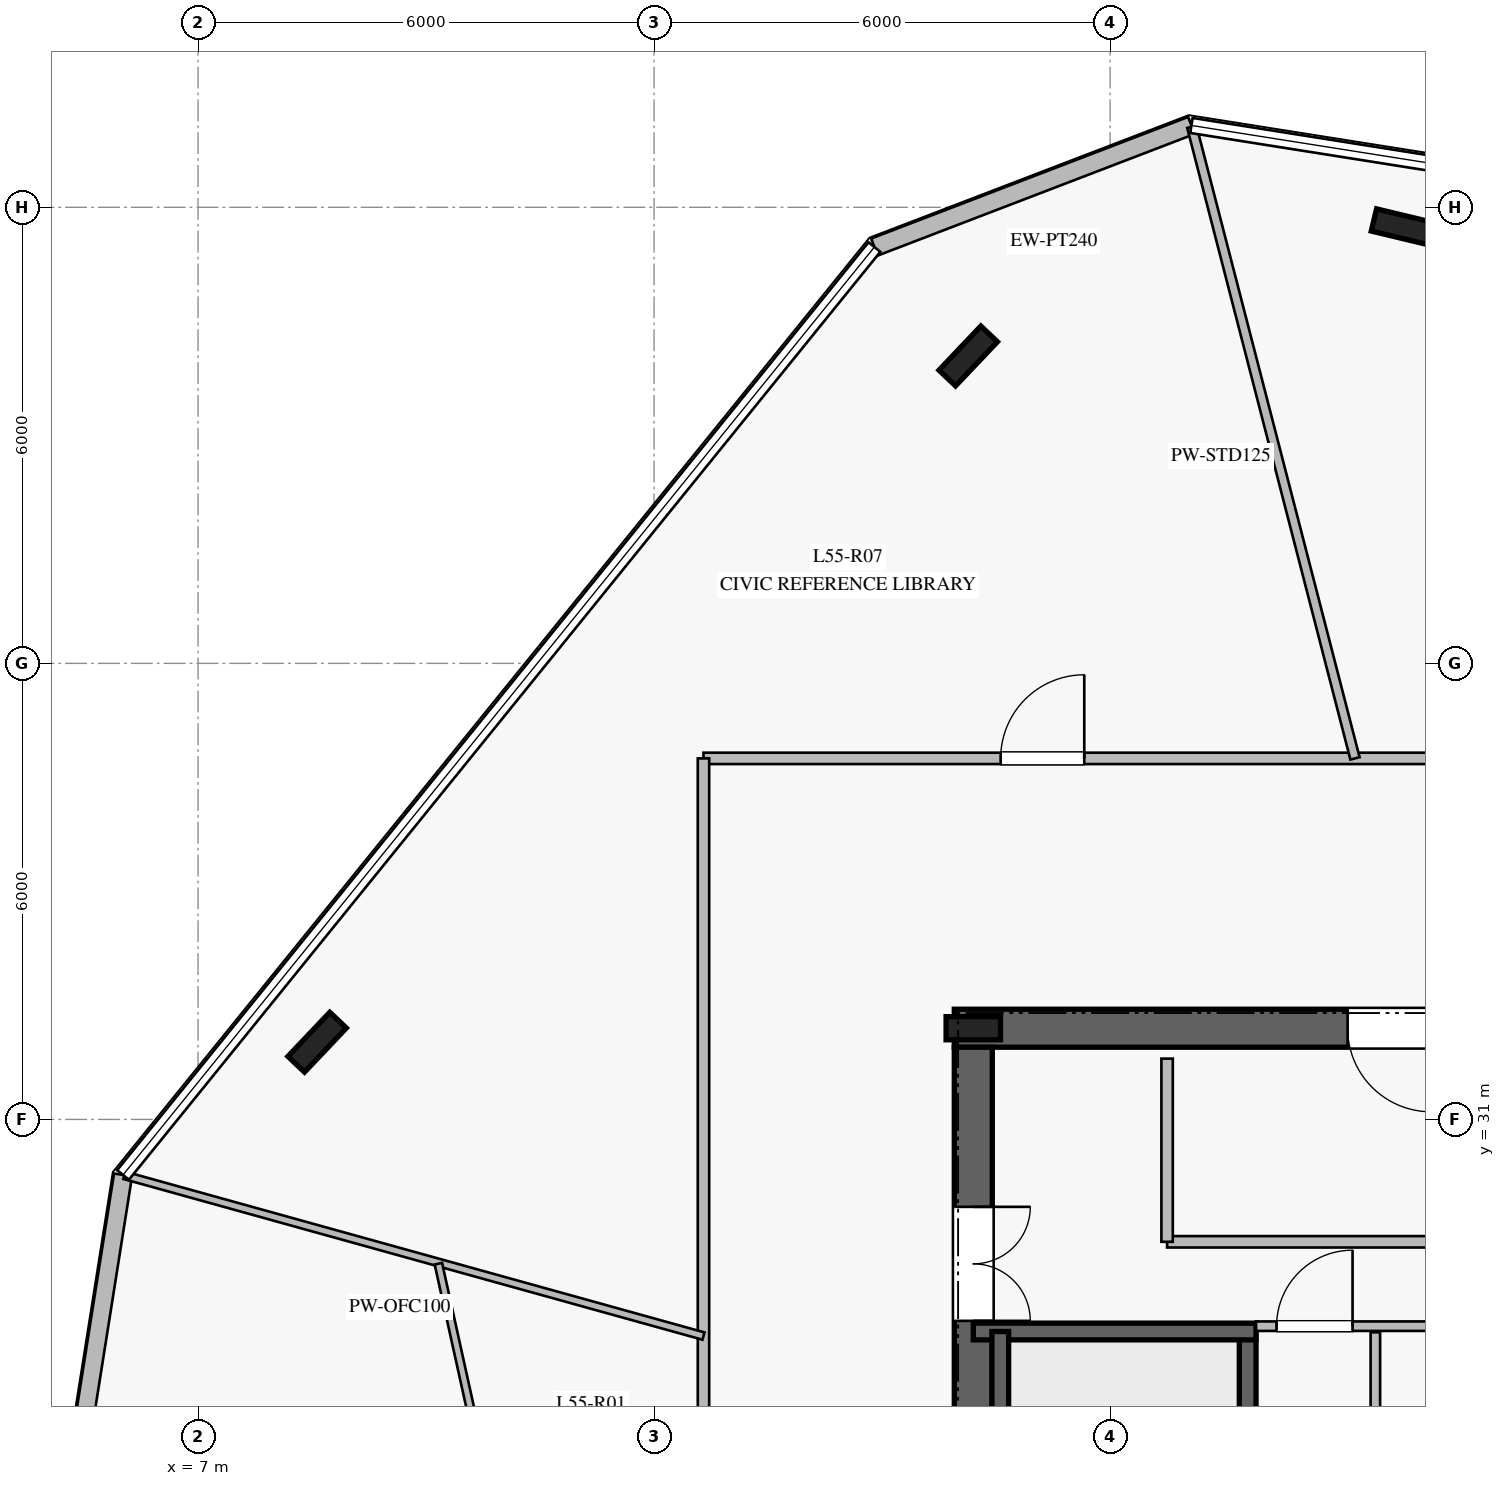
"""IFC4 building model, lengths in metres.
Left out: names, types, materials, properties, quantities, classifications, styles, units other than length and angle.
Written with IfcOpenShell. Run it as: python <this file> out.ifc"""

import sys

from ifc_helpers import new_model, si_unit, direction, frame, frame_2d, origin, origin_2d, place, context, subcontext, project, spatial, rectangle, i_section, extrude, element, fill, save


model = new_model("IFC4")
c1 = context("Model", 3, precision=1e-05, world=origin(), true_north=direction((0.0, 1.0)))
c2 = subcontext(c1, "Body", "Model", "MODEL_VIEW")
j1 = project(units=[si_unit("LENGTHUNIT", "METRE"), si_unit("PLANEANGLEUNIT", "RADIAN")], contexts=[c1])
p1 = place(None, origin())
s1 = spatial("IfcSite", under=j1, at=p1, CompositionType="ELEMENT")
p2 = place(p1, origin())
s2 = spatial("IfcBuilding", under=s1, at=p2, CompositionType="ELEMENT")
p3 = place(p2, frame((0.0, 0.0, 228.8)))
s3 = spatial("IfcBuildingStorey", under=s2, at=p3, CompositionType="ELEMENT", Elevation=228.8)
p4 = place(p3, frame((33.05, 32.2, 0.0), z_axis=(0.0, 0.0, 1.0), x_axis=(-1.0, 0.0, 0.0)))
e1 = element("IfcWall", 1, at=p4, inside=s3, PredefinedType="SHEAR", context=c2, shape_type="SweptSolid", body=[
    extrude(rectangle(XDim=16.1, YDim=0.5, at=frame_2d((8.05, 0.0))), origin(), (0.0, 0.0, 1.0), 3.78),
])
p5 = place(p4, frame((5.0, 0.0, 0.0)))
e2 = element("IfcOpeningElement", 2, at=p5, cuts=e1, PredefinedType="OPENING", context=c2, shape_type="SweptSolid", body=[
    extrude(rectangle(XDim=1.2, YDim=2.25, at=frame_2d((0.6, 1.125))), frame((0.0, 0.26, 0.0), z_axis=(0.0, -1.0, 0.0), x_axis=(1.0, 0.0, 0.0)), (0.0, 0.0, 1.0), 0.52),
])
p6 = place(p4, frame((9.825, 0.0, 0.0)))
e3 = element("IfcOpeningElement", 3, at=p6, cuts=e1, PredefinedType="OPENING", context=c2, shape_type="SweptSolid", body=[
    extrude(rectangle(XDim=1.1, YDim=2.2, at=frame_2d((0.55, 1.1))), frame((0.0, 0.26, 0.0), z_axis=(0.0, -1.0, 0.0), x_axis=(1.0, 0.0, 0.0)), (0.0, 0.0, 1.0), 0.52),
])
p7 = place(p3, frame((17.2, 31.95, 0.0), z_axis=(0.0, 0.0, 1.0), x_axis=(0.0, -1.0, 0.0)))
e4 = element("IfcWall", 4, at=p7, inside=s3, PredefinedType="SHEAR", context=c2, shape_type="SweptSolid", body=[
    extrude(rectangle(XDim=13.9, YDim=0.5, at=frame_2d((6.95, 0.0))), origin(), (0.0, 0.0, 1.0), 3.78),
])
p8 = place(p7, frame((2.1, 0.0, 0.0)))
e5 = element("IfcOpeningElement", 5, at=p8, cuts=e4, PredefinedType="OPENING", context=c2, shape_type="SweptSolid", body=[
    extrude(rectangle(XDim=1.5, YDim=2.2, at=frame_2d((0.75, 1.1))), frame((0.0, 0.26, 0.0), z_axis=(0.0, -1.0, 0.0), x_axis=(1.0, 0.0, 0.0)), (0.0, 0.0, 1.0), 0.52),
])
p9 = place(p3, frame((17.2, 32.2, 0.0), z_axis=(0.0, 0.0, 1.0), x_axis=(1.0, 0.0, 0.0)))
e6 = element("IfcColumn", 6, at=p9, inside=s3, PredefinedType="COLUMN", context=c2, shape_type="SweptSolid", body=[
    extrude(i_section(OverallWidth=0.304, OverallDepth=0.716, WebThickness=0.021, FlangeThickness=0.04, at=origin_2d()), origin(), (0.0, 0.0, 1.0), 4.0),
])
p10 = place(p3, frame((20.81, 20.99, 0.0), z_axis=(0.0, 0.0, 1.0), x_axis=(0.0, 1.0, 0.0)))
e7 = element("IfcWall", 7, at=p10, inside=s3, PredefinedType="SOLIDWALL", context=c2, shape_type="SweptSolid", body=[
    extrude(rectangle(XDim=7.22, YDim=0.22, at=frame_2d((3.61, 0.0))), origin(), (0.0, 0.0, 1.0), 3.78),
])
p11 = place(p10, frame((0.18, 0.0, 0.0)))
e8 = element("IfcOpeningElement", 8, at=p11, cuts=e7, PredefinedType="OPENING", context=c2, shape_type="SweptSolid", body=[
    extrude(rectangle(XDim=1.15, YDim=2.2, at=frame_2d((0.575, 1.1))), frame((0.0, 0.12, 0.0), z_axis=(0.0, -1.0, 0.0), x_axis=(1.0, 0.0, 0.0)), (0.0, 0.0, 1.0), 0.24),
])
p12 = place(p3, frame((17.2, 28.21, 0.0), z_axis=(0.0, 0.0, 1.0), x_axis=(1.0, 0.0, 0.0)))
e9 = element("IfcWall", 9, at=p12, inside=s3, PredefinedType="SOLIDWALL", context=c2, shape_type="SweptSolid", body=[
    extrude(rectangle(XDim=3.72, YDim=0.22, at=frame_2d((1.86, 0.0))), origin(), (0.0, 0.0, 1.0), 3.78),
])
p13 = place(p3, frame((17.555, 28.21, 0.0), z_axis=(0.0, 0.0, 1.0), x_axis=(0.0, -1.0, 0.0)))
e10 = element("IfcWall", 10, at=p13, inside=s3, PredefinedType="SOLIDWALL", context=c2, shape_type="SweptSolid", body=[
    extrude(rectangle(XDim=7.22, YDim=0.22, at=frame_2d((3.61, 0.0))), origin(), (0.0, 0.0, 1.0), 3.78),
])
for number, where, z_axis, x_axis in (
    (11, (22.86, 42.74, 0.0), (0.0, 0.0, 1.0), (-0.972, 0.233, 0.0)),
    (12, (17.133, 41.044, 0.0), (0.0, 0.0, 1.0), (0.688, 0.725, 0.0)),
    (13, (8.567, 32.016, 0.0), (0.0, 0.0, 1.0), (0.688, 0.725, 0.0)),
):
    element("IfcColumn", number, at=place(p3, frame(where, z_axis=z_axis, x_axis=x_axis)), inside=s3, PredefinedType="COLUMN", context=c2, shape_type="SweptSolid", body=[
        extrude(i_section(OverallWidth=0.3, OverallDepth=0.8, WebThickness=0.018, FlangeThickness=0.033, at=origin_2d()), origin(), (0.0, 0.0, 1.0), 4.0),
    ])
p14 = place(p3, frame((20.07, 44.077, 0.0), z_axis=(0.0, 0.0, 1.0), x_axis=(-0.933677607011, -0.358114682982, 0.0)))
e14 = element("IfcWall", 14, at=p14, inside=s3, PredefinedType="STANDARD", context=c2, shape_type="SweptSolid", body=[
    extrude(rectangle(XDim=4.468, YDim=0.24, at=frame_2d((2.234, 0.0))), origin(), (0.0, 0.0, 1.0), 3.78),
])
p15 = place(p3, frame((6.013, 30.27, 0.0), z_axis=(0.0, 0.0, 1.0), x_axis=(-0.156402986275, -0.987693325828, 0.0)))
e15 = element("IfcWall", 15, at=p15, inside=s3, PredefinedType="STANDARD", context=c2, shape_type="SweptSolid", body=[
    extrude(rectangle(XDim=4.469, YDim=0.24, at=frame_2d((2.234, 0.0))), origin(), (0.0, 0.0, 1.0), 3.78),
])
p16 = place(p3, frame((20.92, 28.28, 0.0), z_axis=(0.0, 0.0, 1.0), x_axis=(1.0, 0.0, 0.0)))
e16 = element("IfcWall", 16, at=p16, inside=s3, PredefinedType="PARTITIONING", context=c2, shape_type="SweptSolid", body=[
    extrude(rectangle(XDim=3.405, YDim=0.125, at=frame_2d((1.703, 0.0))), origin(), (0.0, 0.0, 1.0), 3.78),
])
p17 = place(p16, frame((0.27, 0.0, 0.0)))
e17 = element("IfcOpeningElement", 17, at=p17, cuts=e16, PredefinedType="OPENING", context=c2, shape_type="SweptSolid", body=[
    extrude(rectangle(XDim=1.0, YDim=2.15, at=frame_2d((0.5, 1.075))), frame((0.0, 0.073, 0.0), z_axis=(0.0, -1.0, 0.0), x_axis=(1.0, 0.0, 0.0)), (0.0, 0.0, 1.0), 0.145),
])
p18 = place(p3, frame((22.49, 24.97, 0.0), z_axis=(0.0, 0.0, 1.0), x_axis=(0.0, 1.0, 0.0)))
e18 = element("IfcWall", 18, at=p18, inside=s3, PredefinedType="PARTITIONING", context=c2, shape_type="SweptSolid", body=[
    extrude(rectangle(XDim=3.23, YDim=0.125, at=frame_2d((1.615, 0.0))), origin(), (0.0, 0.0, 1.0), 3.78),
])
p19 = place(p3, frame((19.75, 29.39, 0.0), z_axis=(0.0, 0.0, 1.0), x_axis=(1.0, 0.0, 0.0)))
e19 = element("IfcWall", 19, at=p19, inside=s3, PredefinedType="PARTITIONING", context=c2, shape_type="SweptSolid", body=[
    extrude(rectangle(XDim=5.9, YDim=0.15, at=frame_2d((2.95, 0.0))), origin(), (0.0, 0.0, 1.0), 3.78),
])
p20 = place(p3, frame((19.75, 29.39, 0.0), z_axis=(0.0, 0.0, 1.0), x_axis=(0.0, 1.0, 0.0)))
e20 = element("IfcWall", 20, at=p20, inside=s3, PredefinedType="PARTITIONING", context=c2, shape_type="SweptSolid", body=[
    extrude(rectangle(XDim=2.41, YDim=0.15, at=frame_2d((1.205, 0.0))), origin(), (0.0, 0.0, 1.0), 3.78),
])
p21 = place(p3, frame((13.65, 35.75, 0.0), z_axis=(0.0, 0.0, 1.0), x_axis=(1.0, 0.0, 0.0)))
e21 = element("IfcWall", 21, at=p21, inside=s3, PredefinedType="PARTITIONING", context=c2, shape_type="SweptSolid", body=[
    extrude(rectangle(XDim=22.7, YDim=0.15, at=frame_2d((11.35, 0.0))), origin(), (0.0, 0.0, 1.0), 3.05),
])
p22 = place(p21, frame((14.985, 0.0, 0.0)))
e22 = element("IfcOpeningElement", 22, at=p22, cuts=e21, PredefinedType="OPENING", context=c2, shape_type="SweptSolid", body=[
    extrude(rectangle(XDim=1.1, YDim=2.2, at=frame_2d((0.55, 1.1))), frame((0.0, 0.085, 0.0), z_axis=(0.0, -1.0, 0.0), x_axis=(1.0, 0.0, 0.0)), (0.0, 0.0, 1.0), 0.17),
])
p23 = place(p21, frame((3.91, 0.0, 0.0)))
e23 = element("IfcOpeningElement", 23, at=p23, cuts=e21, PredefinedType="OPENING", context=c2, shape_type="SweptSolid", body=[
    extrude(rectangle(XDim=1.1, YDim=2.2, at=frame_2d((0.55, 1.1))), frame((0.0, 0.085, 0.0), z_axis=(0.0, -1.0, 0.0), x_axis=(1.0, 0.0, 0.0)), (0.0, 0.0, 1.0), 0.17),
])
p24 = place(p3, frame((13.65, 14.25, 0.0), z_axis=(0.0, 0.0, 1.0), x_axis=(0.0, 1.0, 0.0)))
e24 = element("IfcWall", 24, at=p24, inside=s3, PredefinedType="PARTITIONING", context=c2, shape_type="SweptSolid", body=[
    extrude(rectangle(XDim=21.5, YDim=0.15, at=frame_2d((10.75, 0.0))), origin(), (0.0, 0.0, 1.0), 3.02),
])
p25 = place(p24, frame((8.036, 0.0, 0.0)))
e25 = element("IfcOpeningElement", 25, at=p25, cuts=e24, PredefinedType="OPENING", context=c2, shape_type="SweptSolid", body=[
    extrude(rectangle(XDim=1.1, YDim=2.2, at=frame_2d((0.55, 1.1))), frame((0.0, 0.085, 0.0), z_axis=(0.0, -1.0, 0.0), x_axis=(1.0, 0.0, 0.0)), (0.0, 0.0, 1.0), 0.17),
])
p26 = place(p3, frame((22.222, 35.75, 0.0), z_axis=(0.0, 0.0, 1.0), x_axis=(-0.25014469809, 0.968208464132, 0.0)))
e26 = element("IfcWall", 26, at=p26, inside=s3, PredefinedType="PARTITIONING", context=c2, shape_type="SweptSolid", body=[
    extrude(rectangle(XDim=8.583, YDim=0.125, at=frame_2d((4.292, 0.0))), origin(), (0.0, 0.0, 1.0), 3.05),
])
p27 = place(p3, frame((13.65, 28.15, 0.0), z_axis=(0.0, 0.0, 1.0), x_axis=(-0.963571409142, 0.267451190843, 0.0)))
e27 = element("IfcWall", 27, at=p27, inside=s3, PredefinedType="MOVABLE", context=c2, shape_type="SweptSolid", body=[
    extrude(rectangle(XDim=7.908, YDim=0.1, at=frame_2d((3.954, 0.0))), origin(), (0.0, 0.0, 1.0), 3.02),
])
p28 = place(p3, frame((10.162, 29.102, 0.0), z_axis=(0.0, 0.0, 1.0), x_axis=(0.216160497281, -0.976357843936, 0.0)))
e28 = element("IfcWall", 28, at=p28, inside=s3, PredefinedType="MOVABLE", context=c2, shape_type="SweptSolid", body=[
    extrude(rectangle(XDim=12.356, YDim=0.1, at=frame_2d((6.178, 0.0))), origin(), (0.0, 0.0, 1.0), 3.22),
])
p29 = place(p28, frame((5.678, 0.0, 0.0)))
e29 = element("IfcOpeningElement", 29, at=p29, cuts=e28, PredefinedType="OPENING", context=c2, shape_type="SweptSolid", body=[
    extrude(rectangle(XDim=1.0, YDim=2.15, at=frame_2d((0.5, 1.075))), frame((0.0, 0.06, 0.0), z_axis=(0.0, -1.0, 0.0), x_axis=(1.0, 0.0, 0.0)), (0.0, 0.0, 1.0), 0.12),
])
p30 = place(p8, origin())
e30 = element("IfcDoor", 30, at=p30, inside=s3, OperationType="DOUBLE_DOOR_SINGLE_SWING", PredefinedType="DOOR", context=c2, shape_type="SweptSolid", body=[
    extrude(rectangle(XDim=1.5, YDim=2.2, at=frame_2d((0.75, 1.1))), frame((0.0, 0.025, 0.0), z_axis=(0.0, -1.0, 0.0), x_axis=(1.0, 0.0, 0.0)), (0.0, 0.0, 1.0), 0.05),
])
fill(e5, e30)
p31 = place(p17, origin())
e31 = element("IfcDoor", 31, at=p31, inside=s3, OperationType="SINGLE_SWING_RIGHT", PredefinedType="DOOR", context=c2, shape_type="SweptSolid", body=[
    extrude(rectangle(XDim=1.0, YDim=2.15, at=frame_2d((0.5, 1.075))), frame((0.0, 0.025, 0.0), z_axis=(0.0, -1.0, 0.0), x_axis=(1.0, 0.0, 0.0)), (0.0, 0.0, 1.0), 0.05),
])
fill(e17, e31)
p32 = place(p6, origin())
e32 = element("IfcDoor", 32, at=p32, inside=s3, OperationType="SINGLE_SWING_LEFT", PredefinedType="DOOR", context=c2, shape_type="SweptSolid", body=[
    extrude(rectangle(XDim=1.1, YDim=2.2, at=frame_2d((0.55, 1.1))), frame((0.0, 0.025, 0.0), z_axis=(0.0, -1.0, 0.0), x_axis=(1.0, 0.0, 0.0)), (0.0, 0.0, 1.0), 0.05),
])
fill(e3, e32)
p33 = place(p23, origin())
e33 = element("IfcDoor", 33, at=p33, inside=s3, OperationType="SINGLE_SWING_RIGHT", PredefinedType="DOOR", context=c2, shape_type="SweptSolid", body=[
    extrude(rectangle(XDim=1.1, YDim=2.2, at=frame_2d((0.55, 1.1))), frame((0.0, 0.025, 0.0), z_axis=(0.0, -1.0, 0.0), x_axis=(1.0, 0.0, 0.0)), (0.0, 0.0, 1.0), 0.05),
])
fill(e23, e33)
save(model, sys.argv[1])
